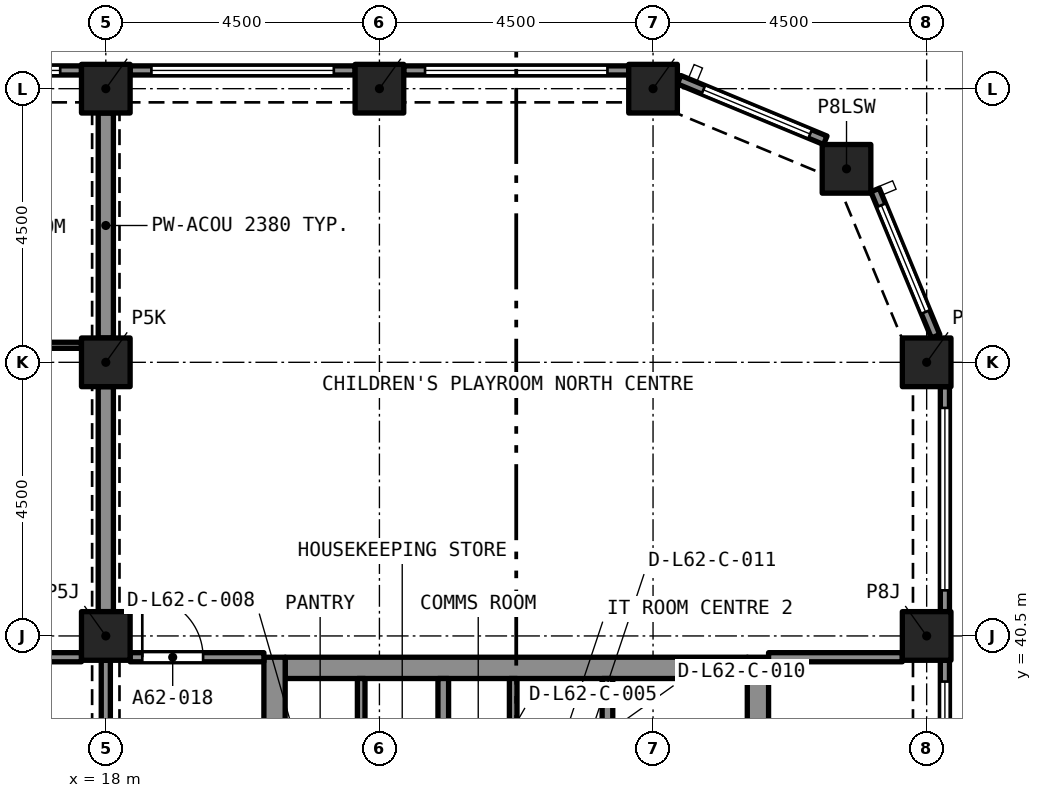
"""IFC4 building model, lengths in metres.
Left out: names, types, materials, properties, quantities, classifications, styles, units other than length and angle.
Written with IfcOpenShell. Run it as: python <this file> out.ifc"""

import sys

from ifc_helpers import new_model, si_unit, direction, frame, frame_2d, origin, origin_2d, place, context, subcontext, project, spatial, rectangle, extrude, element, fill, save


model = new_model("IFC4")
c1 = context("Model", 3, precision=1e-05, world=origin(), true_north=direction((0.0, 1.0)))
c2 = subcontext(c1, "Body", "Model", "MODEL_VIEW")
j1 = project(units=[si_unit("LENGTHUNIT", "METRE"), si_unit("PLANEANGLEUNIT", "RADIAN")], contexts=[c1])
p1 = place(None, origin())
s1 = spatial("IfcSite", under=j1, at=p1, CompositionType="ELEMENT")
p2 = place(p1, origin())
s2 = spatial("IfcBuilding", under=s1, at=p2, CompositionType="ELEMENT")
p3 = place(p2, frame((0.0, 0.0, 222.895)))
s3 = spatial("IfcBuildingStorey", under=s2, at=p3, CompositionType="ELEMENT", Elevation=222.895)
for number, where, z_axis, x_axis in (
    (1, (18.0, 40.5, 0.0), (0.0, 0.0, 1.0), (1.0, 0.0, 0.0)),
    (2, (31.5, 40.5, 0.0), (0.0, 0.0, 1.0), (1.0, 0.0, 0.0)),
    (3, (18.0, 45.0, 0.0), (0.0, 0.0, 1.0), (1.0, 0.0, 0.0)),
    (4, (31.5, 45.0, 0.0), (0.0, 0.0, 1.0), (1.0, 0.0, 0.0)),
    (5, (30.182, 48.182, 0.0), (0.0, 0.0, 1.0), (1.0, 0.0, 0.0)),
    (6, (18.0, 49.5, 0.0), (0.0, 0.0, 1.0), (1.0, 0.0, 0.0)),
    (7, (22.5, 49.5, 0.0), (0.0, 0.0, 1.0), (1.0, 0.0, 0.0)),
    (8, (27.0, 49.5, 0.0), (0.0, 0.0, 1.0), (1.0, 0.0, 0.0)),
):
    element("IfcColumn", number, at=place(p3, frame(where, z_axis=z_axis, x_axis=x_axis)), inside=s3, PredefinedType="COLUMN", context=c2, shape_type="SweptSolid", body=[
        extrude(rectangle(XDim=0.8, YDim=0.8, at=origin_2d()), origin(), (0.0, 0.0, 1.0), 3.2),
    ])
p4 = place(p3, frame((20.95, 39.975, 0.0), z_axis=(0.0, 0.0, 1.0), x_axis=(1.0, 0.0, 0.0)))
e9 = element("IfcWall", 9, at=p4, inside=s3, PredefinedType="SOLIDWALL", context=c2, shape_type="SweptSolid", body=[
    extrude(rectangle(XDim=7.6, YDim=0.35, at=frame_2d((3.8, 0.0))), origin(), (0.0, 0.0, 1.0), 3.2),
])
p5 = place(p3, frame((20.775, 27.35, 0.0), z_axis=(0.0, 0.0, 1.0), x_axis=(0.0, 1.0, 0.0)))
e10 = element("IfcWall", 10, at=p5, inside=s3, PredefinedType="SOLIDWALL", context=c2, shape_type="SweptSolid", body=[
    extrude(rectangle(XDim=12.8, YDim=0.35, at=frame_2d((6.4, 0.0))), origin(), (0.0, 0.0, 1.0), 3.2),
])
p6 = place(p5, frame((8.6, 0.0, 0.0)))
e11 = element("IfcOpeningElement", 11, at=p6, cuts=e10, PredefinedType="OPENING", context=c2, shape_type="SweptSolid", body=[
    extrude(rectangle(XDim=1.2, YDim=2.1, at=frame_2d((0.6, 1.05))), frame((0.0, 0.185, 0.0), z_axis=(0.0, -1.0, 0.0), x_axis=(1.0, 0.0, 0.0)), (0.0, 0.0, 1.0), 0.37),
])
p7 = place(p3, frame((28.725, 27.35, 0.0), z_axis=(0.0, 0.0, 1.0), x_axis=(0.0, 1.0, 0.0)))
e12 = element("IfcWall", 12, at=p7, inside=s3, PredefinedType="SOLIDWALL", context=c2, shape_type="SweptSolid", body=[
    extrude(rectangle(XDim=12.8, YDim=0.35, at=frame_2d((6.4, 0.0))), origin(), (0.0, 0.0, 1.0), 3.2),
])
p8 = place(p7, frame((8.6, 0.0, 0.0)))
e13 = element("IfcOpeningElement", 13, at=p8, cuts=e12, PredefinedType="OPENING", context=c2, shape_type="SweptSolid", body=[
    extrude(rectangle(XDim=1.2, YDim=2.1, at=frame_2d((0.6, 1.05))), frame((0.0, 0.185, 0.0), z_axis=(0.0, -1.0, 0.0), x_axis=(1.0, 0.0, 0.0)), (0.0, 0.0, 1.0), 0.37),
])
p9 = place(p3, frame((31.8, 40.1, 0.0), z_axis=(0.0, 0.0, 1.0), x_axis=(0.0, -1.0, 0.0)))
e14 = element("IfcWall", 14, at=p9, inside=s3, PredefinedType="SOLIDWALL", context=c2, shape_type="SweptSolid", body=[
    extrude(rectangle(XDim=3.7, YDim=0.15, at=frame_2d((1.85, 0.0))), origin(), (0.0, 0.0, 1.0), 3.2),
])
p10 = place(p9, frame((0.35, 0.0, 0.45)))
e15 = element("IfcOpeningElement", 15, at=p10, cuts=e14, PredefinedType="OPENING", context=c2, shape_type="SweptSolid", body=[
    extrude(rectangle(XDim=3.0, YDim=1.95, at=frame_2d((1.5, 0.975))), frame((0.0, 0.085, 0.0), z_axis=(0.0, -1.0, 0.0), x_axis=(1.0, 0.0, 0.0)), (0.0, 0.0, 1.0), 0.17),
])
p11 = place(p3, frame((31.8, 44.6, 0.0), z_axis=(0.0, 0.0, 1.0), x_axis=(0.0, -1.0, 0.0)))
e16 = element("IfcWall", 16, at=p11, inside=s3, PredefinedType="SOLIDWALL", context=c2, shape_type="SweptSolid", body=[
    extrude(rectangle(XDim=3.7, YDim=0.15, at=frame_2d((1.85, 0.0))), origin(), (0.0, 0.0, 1.0), 3.2),
])
p12 = place(p11, frame((0.35, 0.0, 0.45)))
e17 = element("IfcOpeningElement", 17, at=p12, cuts=e16, PredefinedType="OPENING", context=c2, shape_type="SweptSolid", body=[
    extrude(rectangle(XDim=3.0, YDim=1.95, at=frame_2d((1.5, 0.975))), frame((0.0, 0.085, 0.0), z_axis=(0.0, -1.0, 0.0), x_axis=(1.0, 0.0, 0.0)), (0.0, 0.0, 1.0), 0.17),
])
p13 = place(p3, frame((30.651, 47.833, 0.0), z_axis=(0.0, 0.0, 1.0), x_axis=(0.382669406082, -0.923885342263, 0.0)))
e18 = element("IfcWall", 18, at=p13, inside=s3, PredefinedType="SOLIDWALL", context=c2, shape_type="SweptSolid", body=[
    extrude(rectangle(XDim=2.602, YDim=0.15, at=frame_2d((1.301, 0.0))), origin(), (0.0, 0.0, 1.0), 3.2),
])
p14 = place(p13, frame((0.27, 0.0, 0.45)))
e19 = element("IfcOpeningElement", 19, at=p14, cuts=e18, PredefinedType="OPENING", context=c2, shape_type="SweptSolid", body=[
    extrude(rectangle(XDim=1.9, YDim=1.95, at=frame_2d((0.95, 0.975))), frame((0.0, 0.085, 0.0), z_axis=(0.0, -1.0, 0.0), x_axis=(1.0, 0.0, 0.0)), (0.0, 0.0, 1.0), 0.17),
])
p15 = place(p3, frame((27.429, 49.647, 0.0), z_axis=(0.0, 0.0, 1.0), x_axis=(0.923885342263, -0.382669406082, 0.0)))
e20 = element("IfcWall", 20, at=p15, inside=s3, PredefinedType="SOLIDWALL", context=c2, shape_type="SweptSolid", body=[
    extrude(rectangle(XDim=2.602, YDim=0.15, at=frame_2d((1.301, 0.0))), origin(), (0.0, 0.0, 1.0), 3.2),
])
p16 = place(p15, frame((0.432, 0.0, 0.45)))
e21 = element("IfcOpeningElement", 21, at=p16, cuts=e20, PredefinedType="OPENING", context=c2, shape_type="SweptSolid", body=[
    extrude(rectangle(XDim=1.9, YDim=1.95, at=frame_2d((0.95, 0.975))), frame((0.0, 0.085, 0.0), z_axis=(0.0, -1.0, 0.0), x_axis=(1.0, 0.0, 0.0)), (0.0, 0.0, 1.0), 0.17),
])
p17 = place(p3, frame((22.9, 49.8, 0.0), z_axis=(0.0, 0.0, 1.0), x_axis=(1.0, 0.0, 0.0)))
e22 = element("IfcWall", 22, at=p17, inside=s3, PredefinedType="SOLIDWALL", context=c2, shape_type="SweptSolid", body=[
    extrude(rectangle(XDim=3.7, YDim=0.15, at=frame_2d((1.85, 0.0))), origin(), (0.0, 0.0, 1.0), 3.2),
])
p18 = place(p17, frame((0.35, 0.0, 0.45)))
e23 = element("IfcOpeningElement", 23, at=p18, cuts=e22, PredefinedType="OPENING", context=c2, shape_type="SweptSolid", body=[
    extrude(rectangle(XDim=3.0, YDim=1.95, at=frame_2d((1.5, 0.975))), frame((0.0, 0.085, 0.0), z_axis=(0.0, -1.0, 0.0), x_axis=(1.0, 0.0, 0.0)), (0.0, 0.0, 1.0), 0.17),
])
p19 = place(p3, frame((18.4, 49.8, 0.0), z_axis=(0.0, 0.0, 1.0), x_axis=(1.0, 0.0, 0.0)))
e24 = element("IfcWall", 24, at=p19, inside=s3, PredefinedType="SOLIDWALL", context=c2, shape_type="SweptSolid", body=[
    extrude(rectangle(XDim=3.7, YDim=0.15, at=frame_2d((1.85, 0.0))), origin(), (0.0, 0.0, 1.0), 3.2),
])
p20 = place(p19, frame((0.35, 0.0, 0.45)))
e25 = element("IfcOpeningElement", 25, at=p20, cuts=e24, PredefinedType="OPENING", context=c2, shape_type="SweptSolid", body=[
    extrude(rectangle(XDim=3.0, YDim=1.95, at=frame_2d((1.5, 0.975))), frame((0.0, 0.085, 0.0), z_axis=(0.0, -1.0, 0.0), x_axis=(1.0, 0.0, 0.0)), (0.0, 0.0, 1.0), 0.17),
])
p21 = place(p3, frame((13.9, 49.8, 0.0), z_axis=(0.0, 0.0, 1.0), x_axis=(1.0, 0.0, 0.0)))
e26 = element("IfcWall", 26, at=p21, inside=s3, PredefinedType="SOLIDWALL", context=c2, shape_type="SweptSolid", body=[
    extrude(rectangle(XDim=3.7, YDim=0.15, at=frame_2d((1.85, 0.0))), origin(), (0.0, 0.0, 1.0), 3.2),
])
p22 = place(p21, frame((0.35, 0.0, 0.45)))
e27 = element("IfcOpeningElement", 27, at=p22, cuts=e26, PredefinedType="OPENING", context=c2, shape_type="SweptSolid", body=[
    extrude(rectangle(XDim=3.0, YDim=1.95, at=frame_2d((1.5, 0.975))), frame((0.0, 0.085, 0.0), z_axis=(0.0, -1.0, 0.0), x_axis=(1.0, 0.0, 0.0)), (0.0, 0.0, 1.0), 0.17),
])
p23 = place(p3, frame((13.5, 45.28, 0.0), z_axis=(0.0, 0.0, 1.0), x_axis=(1.0, 0.0, 0.0)))
e28 = element("IfcWall", 28, at=p23, inside=s3, PredefinedType="PARTITIONING", context=c2, shape_type="SweptSolid", body=[
    extrude(rectangle(XDim=4.1, YDim=0.1, at=frame_2d((2.05, 0.0))), origin(), (0.0, 0.0, 1.0), 2.9),
])
p24 = place(p23, frame((1.8, 0.0, 0.0)))
e29 = element("IfcOpeningElement", 29, at=p24, cuts=e28, PredefinedType="OPENING", context=c2, shape_type="SweptSolid", body=[
    extrude(rectangle(XDim=0.9, YDim=2.1, at=frame_2d((0.45, 1.05))), frame((0.0, 0.06, 0.0), z_axis=(0.0, -1.0, 0.0), x_axis=(1.0, 0.0, 0.0)), (0.0, 0.0, 1.0), 0.12),
])
for number, where, z_axis, x_axis in (
    (30, (18.0, 45.4, 0.0), (0.0, 0.0, 1.0), (0.0, 1.0, 0.0)),
    (31, (18.0, 40.9, 0.0), (0.0, 0.0, 1.0), (0.0, 1.0, 0.0)),
):
    element("IfcWall", number, at=place(p3, frame(where, z_axis=z_axis, x_axis=x_axis)), inside=s3, PredefinedType="PARTITIONING", context=c2, shape_type="SweptSolid", body=[
        extrude(rectangle(XDim=3.7, YDim=0.25, at=frame_2d((1.85, 0.0))), origin(), (0.0, 0.0, 1.0), 2.38),
    ])
p25 = place(p3, frame((14.95, 40.15, 0.0), z_axis=(0.0, 0.0, 1.0), x_axis=(1.0, 0.0, 0.0)))
e32 = element("IfcWall", 32, at=p25, inside=s3, PredefinedType="PARTITIONING", context=c2, shape_type="SweptSolid", body=[
    extrude(rectangle(XDim=2.65, YDim=0.15, at=frame_2d((1.325, 0.0))), origin(), (0.0, 0.0, 1.0), 2.9),
])
p26 = place(p25, frame((0.2, 0.0, 0.0)))
e33 = element("IfcOpeningElement", 33, at=p26, cuts=e32, PredefinedType="OPENING", context=c2, shape_type="SweptSolid", body=[
    extrude(rectangle(XDim=1.2, YDim=2.4, at=frame_2d((0.6, 1.2))), frame((0.0, 0.085, 0.0), z_axis=(0.0, -1.0, 0.0), x_axis=(1.0, 0.0, 0.0)), (0.0, 0.0, 1.0), 0.17),
])
p27 = place(p3, frame((18.4, 40.15, 0.0), z_axis=(0.0, 0.0, 1.0), x_axis=(1.0, 0.0, 0.0)))
e34 = element("IfcWall", 34, at=p27, inside=s3, PredefinedType="PARTITIONING", context=c2, shape_type="SweptSolid", body=[
    extrude(rectangle(XDim=2.2, YDim=0.15, at=frame_2d((1.1, 0.0))), origin(), (0.0, 0.0, 1.0), 2.75),
])
p28 = place(p27, frame((0.2, 0.0, 0.0)))
e35 = element("IfcOpeningElement", 35, at=p28, cuts=e34, PredefinedType="OPENING", context=c2, shape_type="SweptSolid", body=[
    extrude(rectangle(XDim=1.0, YDim=2.1, at=frame_2d((0.5, 1.05))), frame((0.0, 0.085, 0.0), z_axis=(0.0, -1.0, 0.0), x_axis=(1.0, 0.0, 0.0)), (0.0, 0.0, 1.0), 0.17),
])
p29 = place(p3, frame((28.9, 40.15, 0.0), z_axis=(0.0, 0.0, 1.0), x_axis=(1.0, 0.0, 0.0)))
e36 = element("IfcWall", 36, at=p29, inside=s3, PredefinedType="PARTITIONING", context=c2, shape_type="SweptSolid", body=[
    extrude(rectangle(XDim=2.2, YDim=0.15, at=frame_2d((1.1, 0.0))), origin(), (0.0, 0.0, 1.0), 2.75),
])
p30 = place(p3, frame((18.0, 40.1, 0.0), z_axis=(0.0, 0.0, 1.0), x_axis=(0.0, -1.0, 0.0)))
e37 = element("IfcWall", 37, at=p30, inside=s3, PredefinedType="PARTITIONING", context=c2, shape_type="SweptSolid", body=[
    extrude(rectangle(XDim=3.7, YDim=0.15, at=frame_2d((1.85, 0.0))), origin(), (0.0, 0.0, 1.0), 2.38),
])
p31 = place(p30, frame((1.25, 0.0, 0.0)))
e38 = element("IfcOpeningElement", 38, at=p31, cuts=e37, PredefinedType="OPENING", context=c2, shape_type="SweptSolid", body=[
    extrude(rectangle(XDim=1.2, YDim=2.1, at=frame_2d((0.6, 1.05))), frame((0.0, 0.085, 0.0), z_axis=(0.0, -1.0, 0.0), x_axis=(1.0, 0.0, 0.0)), (0.0, 0.0, 1.0), 0.17),
])
for number, where, z_axis, x_axis in (
    (39, (23.55, 37.5, 0.0), (0.0, 0.0, 1.0), (0.0, 1.0, 0.0)),
    (40, (26.25, 37.5, 0.0), (0.0, 0.0, 1.0), (0.0, 1.0, 0.0)),
):
    element("IfcWall", number, at=place(p3, frame(where, z_axis=z_axis, x_axis=x_axis)), inside=s3, PredefinedType="SOLIDWALL", context=c2, shape_type="SweptSolid", body=[
        extrude(rectangle(XDim=2.3, YDim=0.175, at=frame_2d((1.15, 0.0))), origin(), (0.0, 0.0, 1.0), 2.9),
    ])
for number, where, z_axis, x_axis in (
    (41, (22.2, 37.5, 0.0), (0.0, 0.0, 1.0), (0.0, 1.0, 0.0)),
    (42, (24.7, 37.5, 0.0), (0.0, 0.0, 1.0), (0.0, 1.0, 0.0)),
):
    element("IfcWall", number, at=place(p3, frame(where, z_axis=z_axis, x_axis=x_axis)), inside=s3, PredefinedType="PARTITIONING", context=c2, shape_type="SweptSolid", body=[
        extrude(rectangle(XDim=2.3, YDim=0.125, at=frame_2d((1.15, 0.0))), origin(), (0.0, 0.0, 1.0), 2.9),
    ])
p32 = place(p10, origin())
e43 = element("IfcWindow", 43, at=p32, inside=s3, PartitioningType="SINGLE_PANEL", PredefinedType="WINDOW", context=c2, shape_type="SweptSolid", body=[
    extrude(rectangle(XDim=3.0, YDim=1.95, at=frame_2d((1.5, 0.975))), frame((0.0, 0.03, 0.0), z_axis=(0.0, -1.0, 0.0), x_axis=(1.0, 0.0, 0.0)), (0.0, 0.0, 1.0), 0.06),
])
fill(e15, e43)
p33 = place(p12, origin())
e44 = element("IfcWindow", 44, at=p33, inside=s3, PartitioningType="SINGLE_PANEL", PredefinedType="WINDOW", context=c2, shape_type="SweptSolid", body=[
    extrude(rectangle(XDim=3.0, YDim=1.95, at=frame_2d((1.5, 0.975))), frame((0.0, 0.03, 0.0), z_axis=(0.0, -1.0, 0.0), x_axis=(1.0, 0.0, 0.0)), (0.0, 0.0, 1.0), 0.06),
])
fill(e17, e44)
p34 = place(p14, origin())
e45 = element("IfcWindow", 45, at=p34, inside=s3, PartitioningType="SINGLE_PANEL", PredefinedType="WINDOW", context=c2, shape_type="SweptSolid", body=[
    extrude(rectangle(XDim=1.9, YDim=1.95, at=frame_2d((0.95, 0.975))), frame((0.0, 0.03, 0.0), z_axis=(0.0, -1.0, 0.0), x_axis=(1.0, 0.0, 0.0)), (0.0, 0.0, 1.0), 0.06),
])
fill(e19, e45)
p35 = place(p16, origin())
e46 = element("IfcWindow", 46, at=p35, inside=s3, PartitioningType="SINGLE_PANEL", PredefinedType="WINDOW", context=c2, shape_type="SweptSolid", body=[
    extrude(rectangle(XDim=1.9, YDim=1.95, at=frame_2d((0.95, 0.975))), frame((0.0, 0.03, 0.0), z_axis=(0.0, -1.0, 0.0), x_axis=(1.0, 0.0, 0.0)), (0.0, 0.0, 1.0), 0.06),
])
fill(e21, e46)
p36 = place(p18, origin())
e47 = element("IfcWindow", 47, at=p36, inside=s3, PartitioningType="SINGLE_PANEL", PredefinedType="WINDOW", context=c2, shape_type="SweptSolid", body=[
    extrude(rectangle(XDim=3.0, YDim=1.95, at=frame_2d((1.5, 0.975))), frame((0.0, 0.03, 0.0), z_axis=(0.0, -1.0, 0.0), x_axis=(1.0, 0.0, 0.0)), (0.0, 0.0, 1.0), 0.06),
])
fill(e23, e47)
p37 = place(p20, origin())
e48 = element("IfcWindow", 48, at=p37, inside=s3, PartitioningType="SINGLE_PANEL", PredefinedType="WINDOW", context=c2, shape_type="SweptSolid", body=[
    extrude(rectangle(XDim=3.0, YDim=1.95, at=frame_2d((1.5, 0.975))), frame((0.0, 0.03, 0.0), z_axis=(0.0, -1.0, 0.0), x_axis=(1.0, 0.0, 0.0)), (0.0, 0.0, 1.0), 0.06),
])
fill(e25, e48)
p38 = place(p22, origin())
e49 = element("IfcWindow", 49, at=p38, inside=s3, PartitioningType="SINGLE_PANEL", PredefinedType="WINDOW", context=c2, shape_type="SweptSolid", body=[
    extrude(rectangle(XDim=3.0, YDim=1.95, at=frame_2d((1.5, 0.975))), frame((0.0, 0.03, 0.0), z_axis=(0.0, -1.0, 0.0), x_axis=(1.0, 0.0, 0.0)), (0.0, 0.0, 1.0), 0.06),
])
fill(e27, e49)
p39 = place(p28, origin())
e50 = element("IfcDoor", 50, at=p39, inside=s3, OperationType="SINGLE_SWING_LEFT", PredefinedType="DOOR", context=c2, shape_type="SweptSolid", body=[
    extrude(rectangle(XDim=1.0, YDim=2.1, at=frame_2d((0.5, 1.05))), frame((0.0, 0.025, 0.0), z_axis=(0.0, -1.0, 0.0), x_axis=(1.0, 0.0, 0.0)), (0.0, 0.0, 1.0), 0.05),
])
fill(e35, e50)
save(model, sys.argv[1])
